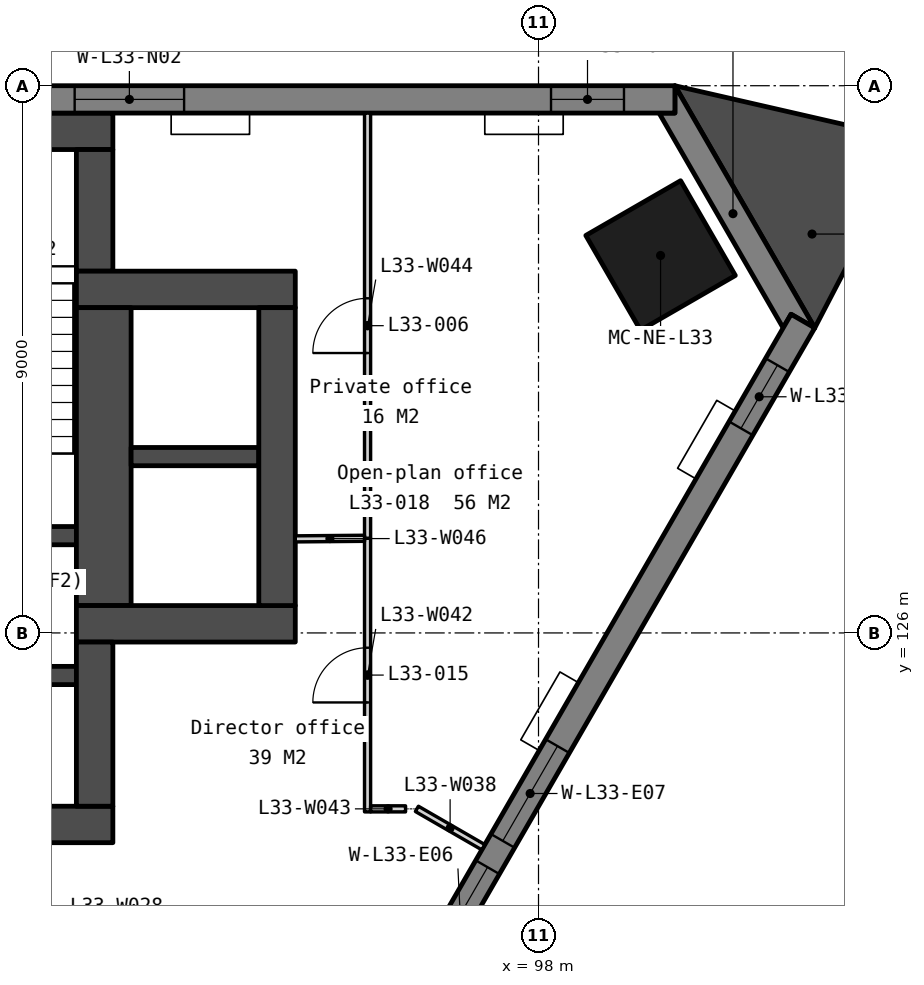
"""IFC4 building model, lengths in metres.
Left out: names, types, materials, properties, quantities, classifications, styles, units other than length and angle.
Written with IfcOpenShell. Run it as: python <this file> out.ifc"""

import sys

from ifc_helpers import new_model, si_unit, direction, frame, frame_2d, origin, origin_2d, place, context, subcontext, project, spatial, polyline, rectangle, outline, extrude, element, fill, save


model = new_model("IFC4")
c1 = context("Model", 3, precision=1e-05, world=origin(), true_north=direction((0.0, 1.0)))
c2 = subcontext(c1, "Body", "Model", "MODEL_VIEW")
j1 = project(units=[si_unit("LENGTHUNIT", "METRE"), si_unit("PLANEANGLEUNIT", "RADIAN")], contexts=[c1])
p1 = place(None, origin())
s1 = spatial("IfcSite", under=j1, at=p1, CompositionType="ELEMENT")
p2 = place(p1, origin())
s2 = spatial("IfcBuilding", under=s1, at=p2, CompositionType="ELEMENT")
p3 = place(p2, frame((0.0, 0.0, 132.5)))
s3 = spatial("IfcBuildingStorey", under=s2, at=p3, CompositionType="ELEMENT", Elevation=132.5)
p4 = place(p3, frame((100.007, 132.208, 0.0), z_axis=(0.0, 0.0, 1.0), x_axis=(-0.5, 0.866025403784, 0.0)))
e1 = element("IfcColumn", 1, at=p4, inside=s3, PredefinedType="COLUMN", context=c2, shape_type="SweptSolid", body=[
    extrude(rectangle(XDim=1.8, YDim=1.8, at=origin_2d()), origin(), (0.0, 0.0, 1.0), 3.9),
])
p5 = place(p3, frame((69.0, 134.25, 0.0), z_axis=(0.0, 0.0, 1.0), x_axis=(1.0, 0.0, 0.0)))
e2 = element("IfcWall", 2, at=p5, inside=s3, PredefinedType="SOLIDWALL", context=c2, shape_type="SweptSolid", body=[
    extrude(rectangle(XDim=22.0, YDim=0.6, at=frame_2d((11.0, 0.0))), origin(), (0.0, 0.0, 1.0), 3.75),
])
p6 = place(p3, frame((69.0, 122.85, 0.0), z_axis=(0.0, 0.0, 1.0), x_axis=(1.0, 0.0, 0.0)))
e3 = element("IfcWall", 3, at=p6, inside=s3, PredefinedType="SOLIDWALL", context=c2, shape_type="SweptSolid", body=[
    extrude(rectangle(XDim=22.0, YDim=0.6, at=frame_2d((11.0, 0.0))), origin(), (0.0, 0.0, 1.0), 3.75),
])
p7 = place(p6, frame((16.375, 0.0, 0.0)))
e4 = element("IfcOpeningElement", 4, at=p7, cuts=e3, PredefinedType="OPENING", context=c2, shape_type="SweptSolid", body=[
    extrude(rectangle(XDim=1.8, YDim=2.1, at=frame_2d((0.9, 1.05))), frame((0.0, 0.31, 0.0), z_axis=(0.0, -1.0, 0.0), x_axis=(1.0, 0.0, 0.0)), (0.0, 0.0, 1.0), 0.62),
])
p8 = place(p6, frame((3.825, 0.0, 0.0)))
e5 = element("IfcOpeningElement", 5, at=p8, cuts=e3, PredefinedType="OPENING", context=c2, shape_type="SweptSolid", body=[
    extrude(rectangle(XDim=1.8, YDim=2.1, at=frame_2d((0.9, 1.05))), frame((0.0, 0.31, 0.0), z_axis=(0.0, -1.0, 0.0), x_axis=(1.0, 0.0, 0.0)), (0.0, 0.0, 1.0), 0.62),
])
p9 = place(p6, frame((12.85, 0.0, 0.0)))
e6 = element("IfcOpeningElement", 6, at=p9, cuts=e3, PredefinedType="OPENING", context=c2, shape_type="SweptSolid", body=[
    extrude(rectangle(XDim=1.5, YDim=2.1, at=frame_2d((0.75, 1.05))), frame((0.0, 0.31, 0.0), z_axis=(0.0, -1.0, 0.0), x_axis=(1.0, 0.0, 0.0)), (0.0, 0.0, 1.0), 0.62),
])
for number, where, z_axis, x_axis in (
    (7, (87.85, 127.6, 0.0), (0.0, 0.0, 1.0), (1.0, 0.0, 0.0)),
    (8, (87.85, 125.3, 0.0), (0.0, 0.0, 1.0), (1.0, 0.0, 0.0)),
):
    element("IfcWall", number, at=place(p3, frame(where, z_axis=z_axis, x_axis=x_axis)), inside=s3, PredefinedType="SOLIDWALL", context=c2, shape_type="SweptSolid", body=[
        extrude(rectangle(XDim=2.55, YDim=0.3, at=frame_2d((1.275, 0.0))), origin(), (0.0, 0.0, 1.0), 3.75),
    ])
p10 = place(p3, frame((90.7, 133.95, 0.0), z_axis=(0.0, 0.0, 1.0), x_axis=(0.0, -1.0, 0.0)))
e9 = element("IfcWall", 9, at=p10, inside=s3, PredefinedType="SOLIDWALL", context=c2, shape_type="SweptSolid", body=[
    extrude(rectangle(XDim=2.0, YDim=0.6, at=frame_2d((1.0, 0.0))), origin(), (0.0, 0.0, 1.0), 3.75),
])
p11 = place(p3, frame((90.4, 131.65, 0.0), z_axis=(0.0, 0.0, 1.0), x_axis=(1.0, 0.0, 0.0)))
e10 = element("IfcWall", 10, at=p11, inside=s3, PredefinedType="SOLIDWALL", context=c2, shape_type="SweptSolid", body=[
    extrude(rectangle(XDim=3.6, YDim=0.6, at=frame_2d((1.8, 0.0))), origin(), (0.0, 0.0, 1.0), 3.75),
])
p12 = place(p3, frame((90.85, 131.35, 0.0), z_axis=(0.0, 0.0, 1.0), x_axis=(0.0, -1.0, 0.0)))
e11 = element("IfcWall", 11, at=p12, inside=s3, PredefinedType="SOLIDWALL", context=c2, shape_type="SweptSolid", body=[
    extrude(rectangle(XDim=4.9, YDim=0.9, at=frame_2d((2.45, 0.0))), origin(), (0.0, 0.0, 1.0), 3.75),
])
p13 = place(p3, frame((90.4, 126.15, 0.0), z_axis=(0.0, 0.0, 1.0), x_axis=(1.0, 0.0, 0.0)))
e12 = element("IfcWall", 12, at=p13, inside=s3, PredefinedType="SOLIDWALL", context=c2, shape_type="SweptSolid", body=[
    extrude(rectangle(XDim=3.6, YDim=0.6, at=frame_2d((1.8, 0.0))), origin(), (0.0, 0.0, 1.0), 3.75),
])
p14 = place(p3, frame((90.7, 125.85, 0.0), z_axis=(0.0, 0.0, 1.0), x_axis=(0.0, -1.0, 0.0)))
e13 = element("IfcWall", 13, at=p14, inside=s3, PredefinedType="SOLIDWALL", context=c2, shape_type="SweptSolid", body=[
    extrude(rectangle(XDim=2.7, YDim=0.6, at=frame_2d((1.35, 0.0))), origin(), (0.0, 0.0, 1.0), 3.75),
])
p15 = place(p3, frame((91.3, 128.9, 0.0), z_axis=(0.0, 0.0, 1.0), x_axis=(1.0, 0.0, 0.0)))
e14 = element("IfcWall", 14, at=p15, inside=s3, PredefinedType="SOLIDWALL", context=c2, shape_type="SweptSolid", body=[
    extrude(rectangle(XDim=2.1, YDim=0.3, at=frame_2d((1.05, 0.0))), origin(), (0.0, 0.0, 1.0), 3.75),
])
p16 = place(p3, frame((93.7, 131.35, 0.0), z_axis=(0.0, 0.0, 1.0), x_axis=(0.0, -1.0, 0.0)))
e15 = element("IfcWall", 15, at=p16, inside=s3, PredefinedType="SOLIDWALL", context=c2, shape_type="SweptSolid", body=[
    extrude(rectangle(XDim=4.9, YDim=0.6, at=frame_2d((2.45, 0.0))), origin(), (0.0, 0.0, 1.0), 3.75),
])
p17 = place(p3, frame((0.0, 0.0, -0.15)))
e16 = element("IfcWall", 16, at=p17, inside=s3, PredefinedType="SOLIDWALL", context=c2, shape_type="SweptSolid", body=[
    extrude(outline(polyline([(102.543, 131.016), (102.153, 131.241), (102.023, 131.016), (99.983, 134.55), (100.243, 134.55), (100.243, 135.0), (102.543, 131.016)])), origin(), (0.0, 0.0, 1.0), 3.9),
])
p18 = place(p3, frame((100.243, 134.775, -0.15), z_axis=(0.0, 0.0, 1.0), x_axis=(-1.0, 0.0, 0.0)))
e17 = element("IfcWall", 17, at=p18, inside=s3, PredefinedType="SOLIDWALL", context=c2, shape_type="SweptSolid", body=[
    extrude(outline(polyline([(40.486, 0.0), (40.486, 3.9), (0.0, 3.9), (0.0, 0.0), (40.486, 0.0)])), frame((0.0, 0.225, 0.0), z_axis=(0.0, -1.0, 0.0), x_axis=(1.0, 0.0, 0.0)), (0.0, 0.0, 1.0), 0.45),
])
p19 = place(p18, frame((0.837, 0.0, 0.95)))
e18 = element("IfcOpeningElement", 18, at=p19, cuts=e17, PredefinedType="OPENING", context=c2, shape_type="SweptSolid", body=[
    extrude(rectangle(XDim=1.2, YDim=2.2, at=frame_2d((0.6, 1.1))), frame((0.0, 0.235, 0.0), z_axis=(0.0, -1.0, 0.0), x_axis=(1.0, 0.0, 0.0)), (0.0, 0.0, 1.0), 0.47),
])
p20 = place(p18, frame((8.072, 0.0, 0.95)))
e19 = element("IfcOpeningElement", 19, at=p20, cuts=e17, PredefinedType="OPENING", context=c2, shape_type="SweptSolid", body=[
    extrude(rectangle(XDim=1.8, YDim=2.2, at=frame_2d((0.9, 1.1))), frame((0.0, 0.235, 0.0), z_axis=(0.0, -1.0, 0.0), x_axis=(1.0, 0.0, 0.0)), (0.0, 0.0, 1.0), 0.47),
])
p21 = place(p18, frame((10.372, 0.0, 0.95)))
e20 = element("IfcOpeningElement", 20, at=p21, cuts=e17, PredefinedType="OPENING", context=c2, shape_type="SweptSolid", body=[
    extrude(rectangle(XDim=1.8, YDim=2.2, at=frame_2d((0.9, 1.1))), frame((0.0, 0.235, 0.0), z_axis=(0.0, -1.0, 0.0), x_axis=(1.0, 0.0, 0.0)), (0.0, 0.0, 1.0), 0.47),
])
p22 = place(p18, frame((18.193, 0.0, 0.95)))
e21 = element("IfcOpeningElement", 21, at=p22, cuts=e17, PredefinedType="OPENING", context=c2, shape_type="SweptSolid", body=[
    extrude(rectangle(XDim=1.8, YDim=2.2, at=frame_2d((0.9, 1.1))), frame((0.0, 0.235, 0.0), z_axis=(0.0, -1.0, 0.0), x_axis=(1.0, 0.0, 0.0)), (0.0, 0.0, 1.0), 0.47),
])
p23 = place(p18, frame((20.493, 0.0, 0.95)))
e22 = element("IfcOpeningElement", 22, at=p23, cuts=e17, PredefinedType="OPENING", context=c2, shape_type="SweptSolid", body=[
    extrude(rectangle(XDim=1.8, YDim=2.2, at=frame_2d((0.9, 1.1))), frame((0.0, 0.235, 0.0), z_axis=(0.0, -1.0, 0.0), x_axis=(1.0, 0.0, 0.0)), (0.0, 0.0, 1.0), 0.47),
])
p24 = place(p18, frame((28.315, 0.0, 0.95)))
e23 = element("IfcOpeningElement", 23, at=p24, cuts=e17, PredefinedType="OPENING", context=c2, shape_type="SweptSolid", body=[
    extrude(rectangle(XDim=1.8, YDim=2.2, at=frame_2d((0.9, 1.1))), frame((0.0, 0.235, 0.0), z_axis=(0.0, -1.0, 0.0), x_axis=(1.0, 0.0, 0.0)), (0.0, 0.0, 1.0), 0.47),
])
p25 = place(p18, frame((30.615, 0.0, 0.95)))
e24 = element("IfcOpeningElement", 24, at=p25, cuts=e17, PredefinedType="OPENING", context=c2, shape_type="SweptSolid", body=[
    extrude(rectangle(XDim=1.8, YDim=2.2, at=frame_2d((0.9, 1.1))), frame((0.0, 0.235, 0.0), z_axis=(0.0, -1.0, 0.0), x_axis=(1.0, 0.0, 0.0)), (0.0, 0.0, 1.0), 0.47),
])
p26 = place(p18, frame((38.449, 0.0, 0.95)))
e25 = element("IfcOpeningElement", 25, at=p26, cuts=e17, PredefinedType="OPENING", context=c2, shape_type="SweptSolid", body=[
    extrude(rectangle(XDim=1.2, YDim=2.2, at=frame_2d((0.6, 1.1))), frame((0.0, 0.235, 0.0), z_axis=(0.0, -1.0, 0.0), x_axis=(1.0, 0.0, 0.0)), (0.0, 0.0, 1.0), 0.47),
])
p27 = place(p3, frame((82.105, 96.067, -0.15), z_axis=(0.0, 0.0, 1.0), x_axis=(0.499997369791, 0.866026922331, 0.0)))
e26 = element("IfcWall", 26, at=p27, inside=s3, PredefinedType="SOLIDWALL", context=c2, shape_type="SweptSolid", body=[
    extrude(outline(polyline([(40.486, 0.0), (40.486, 3.9), (0.0, 3.9), (0.0, 0.0), (40.486, 0.0)])), frame((0.0, 0.225, 0.0), z_axis=(0.0, -1.0, 0.0), x_axis=(1.0, 0.0, 0.0)), (0.0, 0.0, 1.0), 0.45),
])
p28 = place(p27, frame((0.837, 0.0, 0.95)))
e27 = element("IfcOpeningElement", 27, at=p28, cuts=e26, PredefinedType="OPENING", context=c2, shape_type="SweptSolid", body=[
    extrude(rectangle(XDim=1.2, YDim=2.2, at=frame_2d((0.6, 1.1))), frame((0.0, 0.235, 0.0), z_axis=(0.0, -1.0, 0.0), x_axis=(1.0, 0.0, 0.0)), (0.0, 0.0, 1.0), 0.47),
])
p29 = place(p27, frame((8.072, 0.0, 0.95)))
e28 = element("IfcOpeningElement", 28, at=p29, cuts=e26, PredefinedType="OPENING", context=c2, shape_type="SweptSolid", body=[
    extrude(rectangle(XDim=1.8, YDim=2.2, at=frame_2d((0.9, 1.1))), frame((0.0, 0.235, 0.0), z_axis=(0.0, -1.0, 0.0), x_axis=(1.0, 0.0, 0.0)), (0.0, 0.0, 1.0), 0.47),
])
p30 = place(p27, frame((10.372, 0.0, 0.95)))
e29 = element("IfcOpeningElement", 29, at=p30, cuts=e26, PredefinedType="OPENING", context=c2, shape_type="SweptSolid", body=[
    extrude(rectangle(XDim=1.8, YDim=2.2, at=frame_2d((0.9, 1.1))), frame((0.0, 0.235, 0.0), z_axis=(0.0, -1.0, 0.0), x_axis=(1.0, 0.0, 0.0)), (0.0, 0.0, 1.0), 0.47),
])
p31 = place(p27, frame((18.193, 0.0, 0.95)))
e30 = element("IfcOpeningElement", 30, at=p31, cuts=e26, PredefinedType="OPENING", context=c2, shape_type="SweptSolid", body=[
    extrude(rectangle(XDim=1.8, YDim=2.2, at=frame_2d((0.9, 1.1))), frame((0.0, 0.235, 0.0), z_axis=(0.0, -1.0, 0.0), x_axis=(1.0, 0.0, 0.0)), (0.0, 0.0, 1.0), 0.47),
])
p32 = place(p27, frame((20.493, 0.0, 0.95)))
e31 = element("IfcOpeningElement", 31, at=p32, cuts=e26, PredefinedType="OPENING", context=c2, shape_type="SweptSolid", body=[
    extrude(rectangle(XDim=1.8, YDim=2.2, at=frame_2d((0.9, 1.1))), frame((0.0, 0.235, 0.0), z_axis=(0.0, -1.0, 0.0), x_axis=(1.0, 0.0, 0.0)), (0.0, 0.0, 1.0), 0.47),
])
p33 = place(p27, frame((28.315, 0.0, 0.95)))
e32 = element("IfcOpeningElement", 32, at=p33, cuts=e26, PredefinedType="OPENING", context=c2, shape_type="SweptSolid", body=[
    extrude(rectangle(XDim=1.8, YDim=2.2, at=frame_2d((0.9, 1.1))), frame((0.0, 0.235, 0.0), z_axis=(0.0, -1.0, 0.0), x_axis=(1.0, 0.0, 0.0)), (0.0, 0.0, 1.0), 0.47),
])
p34 = place(p27, frame((30.615, 0.0, 0.95)))
e33 = element("IfcOpeningElement", 33, at=p34, cuts=e26, PredefinedType="OPENING", context=c2, shape_type="SweptSolid", body=[
    extrude(rectangle(XDim=1.8, YDim=2.2, at=frame_2d((0.9, 1.1))), frame((0.0, 0.235, 0.0), z_axis=(0.0, -1.0, 0.0), x_axis=(1.0, 0.0, 0.0)), (0.0, 0.0, 1.0), 0.47),
])
p35 = place(p27, frame((38.449, 0.0, 0.95)))
e34 = element("IfcOpeningElement", 34, at=p35, cuts=e26, PredefinedType="OPENING", context=c2, shape_type="SweptSolid", body=[
    extrude(rectangle(XDim=1.2, YDim=2.2, at=frame_2d((0.6, 1.1))), frame((0.0, 0.235, 0.0), z_axis=(0.0, -1.0, 0.0), x_axis=(1.0, 0.0, 0.0)), (0.0, 0.0, 1.0), 0.47),
])
p36 = place(p3, frame((0.0, 0.0, -0.15)))
e35 = element("IfcWall", 35, at=p36, inside=s3, PredefinedType="SOLIDWALL", context=c2, shape_type="SweptSolid", body=[
    extrude(outline(polyline([(102.543, 131.016), (104.148, 134.104), (100.243, 135.0), (102.543, 131.016)])), origin(), (0.0, 0.0, 1.0), 3.9),
])
p37 = place(p3, frame((87.557, 122.137, 0.0), z_axis=(0.0, 0.0, 1.0), x_axis=(0.866029768103, -0.499992440702, 0.0)))
e36 = element("IfcWall", 36, at=p37, inside=s3, PredefinedType="PARTITIONING", context=c2, shape_type="SweptSolid", body=[
    extrude(rectangle(XDim=8.089, YDim=0.1, at=frame_2d((4.044, 0.0))), origin(), (0.0, 0.0, 1.0), 3.75),
])
p38 = place(p37, frame((3.594, 0.0, 0.0)))
e37 = element("IfcOpeningElement", 37, at=p38, cuts=e36, PredefinedType="OPENING", context=c2, shape_type="SweptSolid", body=[
    extrude(rectangle(XDim=0.9, YDim=2.1, at=frame_2d((0.45, 1.05))), frame((0.0, 0.06, 0.0), z_axis=(0.0, -1.0, 0.0), x_axis=(1.0, 0.0, 0.0)), (0.0, 0.0, 1.0), 0.12),
])
p39 = place(p3, frame((96.0, 123.106, 0.0), z_axis=(0.0, 0.0, 1.0), x_axis=(0.86607923909, -0.499906742921, 0.0)))
e38 = element("IfcWall", 38, at=p39, inside=s3, PredefinedType="PARTITIONING", context=c2, shape_type="SweptSolid", body=[
    extrude(rectangle(XDim=1.261, YDim=0.1, at=frame_2d((0.631, 0.0))), origin(), (0.0, 0.0, 1.0), 3.75),
])
p40 = place(p3, frame((95.189, 123.057, 0.0), z_axis=(0.0, 0.0, 1.0), x_axis=(0.0, 1.0, 0.0)))
e39 = element("IfcWall", 39, at=p40, inside=s3, PredefinedType="PARTITIONING", context=c2, shape_type="SweptSolid", body=[
    extrude(rectangle(XDim=4.5, YDim=0.1, at=frame_2d((2.25, 0.0))), origin(), (0.0, 0.0, 1.0), 3.75),
])
p41 = place(p40, frame((1.8, 0.0, 0.0)))
e40 = element("IfcOpeningElement", 40, at=p41, cuts=e39, PredefinedType="OPENING", context=c2, shape_type="SweptSolid", body=[
    extrude(rectangle(XDim=0.9, YDim=2.1, at=frame_2d((0.45, 1.05))), frame((0.0, 0.06, 0.0), z_axis=(0.0, -1.0, 0.0), x_axis=(1.0, 0.0, 0.0)), (0.0, 0.0, 1.0), 0.12),
])
p42 = place(p3, frame((95.239, 123.107, 0.0), z_axis=(0.0, 0.0, 1.0), x_axis=(0.999999909769, -0.000424808798, 0.0)))
e41 = element("IfcWall", 41, at=p42, inside=s3, PredefinedType="PARTITIONING", context=c2, shape_type="SweptSolid", body=[
    extrude(rectangle(XDim=0.575, YDim=0.1, at=frame_2d((0.287, 0.0))), origin(), (0.0, 0.0, 1.0), 3.75),
])
p43 = place(p3, frame((95.189, 127.557, 0.0), z_axis=(0.0, 0.0, 1.0), x_axis=(0.0, 1.0, 0.0)))
e42 = element("IfcWall", 42, at=p43, inside=s3, PredefinedType="PARTITIONING", context=c2, shape_type="SweptSolid", body=[
    extrude(rectangle(XDim=6.993, YDim=0.1, at=frame_2d((3.497, 0.0))), origin(), (0.0, 0.0, 1.0), 3.75),
])
p44 = place(p43, frame((3.046, 0.0, 0.0)))
e43 = element("IfcOpeningElement", 43, at=p44, cuts=e42, PredefinedType="OPENING", context=c2, shape_type="SweptSolid", body=[
    extrude(rectangle(XDim=0.9, YDim=2.1, at=frame_2d((0.45, 1.05))), frame((0.0, 0.06, 0.0), z_axis=(0.0, -1.0, 0.0), x_axis=(1.0, 0.0, 0.0)), (0.0, 0.0, 1.0), 0.12),
])
p45 = place(p3, frame((94.0, 127.547, 0.0), z_axis=(0.0, 0.0, 1.0), x_axis=(0.999965040971, 0.008361628773, 0.0)))
e44 = element("IfcWall", 44, at=p45, inside=s3, PredefinedType="PARTITIONING", context=c2, shape_type="SweptSolid", body=[
    extrude(rectangle(XDim=1.139, YDim=0.1, at=frame_2d((0.569, 0.0))), origin(), (0.0, 0.0, 1.0), 3.75),
])
p46 = place(p19, origin())
e45 = element("IfcWindow", 45, at=p46, inside=s3, PartitioningType="SINGLE_PANEL", PredefinedType="WINDOW", context=c2, shape_type="SweptSolid", body=[
    extrude(rectangle(XDim=1.2, YDim=2.2, at=frame_2d((0.6, 1.1))), frame((0.0, 0.03, 0.0), z_axis=(0.0, -1.0, 0.0), x_axis=(1.0, 0.0, 0.0)), (0.0, 0.0, 1.0), 0.06),
])
fill(e18, e45)
p47 = place(p20, origin())
e46 = element("IfcWindow", 46, at=p47, inside=s3, PartitioningType="SINGLE_PANEL", PredefinedType="WINDOW", context=c2, shape_type="SweptSolid", body=[
    extrude(rectangle(XDim=1.8, YDim=2.2, at=frame_2d((0.9, 1.1))), frame((0.0, 0.03, 0.0), z_axis=(0.0, -1.0, 0.0), x_axis=(1.0, 0.0, 0.0)), (0.0, 0.0, 1.0), 0.06),
])
fill(e19, e46)
p48 = place(p33, origin())
e47 = element("IfcWindow", 47, at=p48, inside=s3, PartitioningType="SINGLE_PANEL", PredefinedType="WINDOW", context=c2, shape_type="SweptSolid", body=[
    extrude(rectangle(XDim=1.8, YDim=2.2, at=frame_2d((0.9, 1.1))), frame((0.0, 0.03, 0.0), z_axis=(0.0, -1.0, 0.0), x_axis=(1.0, 0.0, 0.0)), (0.0, 0.0, 1.0), 0.06),
])
fill(e32, e47)
p49 = place(p34, origin())
e48 = element("IfcWindow", 48, at=p49, inside=s3, PartitioningType="SINGLE_PANEL", PredefinedType="WINDOW", context=c2, shape_type="SweptSolid", body=[
    extrude(rectangle(XDim=1.8, YDim=2.2, at=frame_2d((0.9, 1.1))), frame((0.0, 0.03, 0.0), z_axis=(0.0, -1.0, 0.0), x_axis=(1.0, 0.0, 0.0)), (0.0, 0.0, 1.0), 0.06),
])
fill(e33, e48)
p50 = place(p35, origin())
e49 = element("IfcWindow", 49, at=p50, inside=s3, PartitioningType="SINGLE_PANEL", PredefinedType="WINDOW", context=c2, shape_type="SweptSolid", body=[
    extrude(rectangle(XDim=1.2, YDim=2.2, at=frame_2d((0.6, 1.1))), frame((0.0, 0.03, 0.0), z_axis=(0.0, -1.0, 0.0), x_axis=(1.0, 0.0, 0.0)), (0.0, 0.0, 1.0), 0.06),
])
fill(e34, e49)
p51 = place(p44, origin())
e50 = element("IfcDoor", 50, at=p51, inside=s3, OperationType="SINGLE_SWING_LEFT", PredefinedType="DOOR", context=c2, shape_type="SweptSolid", body=[
    extrude(rectangle(XDim=0.9, YDim=2.1, at=frame_2d((0.45, 1.05))), frame((0.0, 0.025, 0.0), z_axis=(0.0, -1.0, 0.0), x_axis=(1.0, 0.0, 0.0)), (0.0, 0.0, 1.0), 0.05),
])
fill(e43, e50)
p52 = place(p41, origin())
e51 = element("IfcDoor", 51, at=p52, inside=s3, OperationType="SINGLE_SWING_LEFT", PredefinedType="DOOR", context=c2, shape_type="SweptSolid", body=[
    extrude(rectangle(XDim=0.9, YDim=2.1, at=frame_2d((0.45, 1.05))), frame((0.0, 0.025, 0.0), z_axis=(0.0, -1.0, 0.0), x_axis=(1.0, 0.0, 0.0)), (0.0, 0.0, 1.0), 0.05),
])
fill(e40, e51)
save(model, sys.argv[1])
